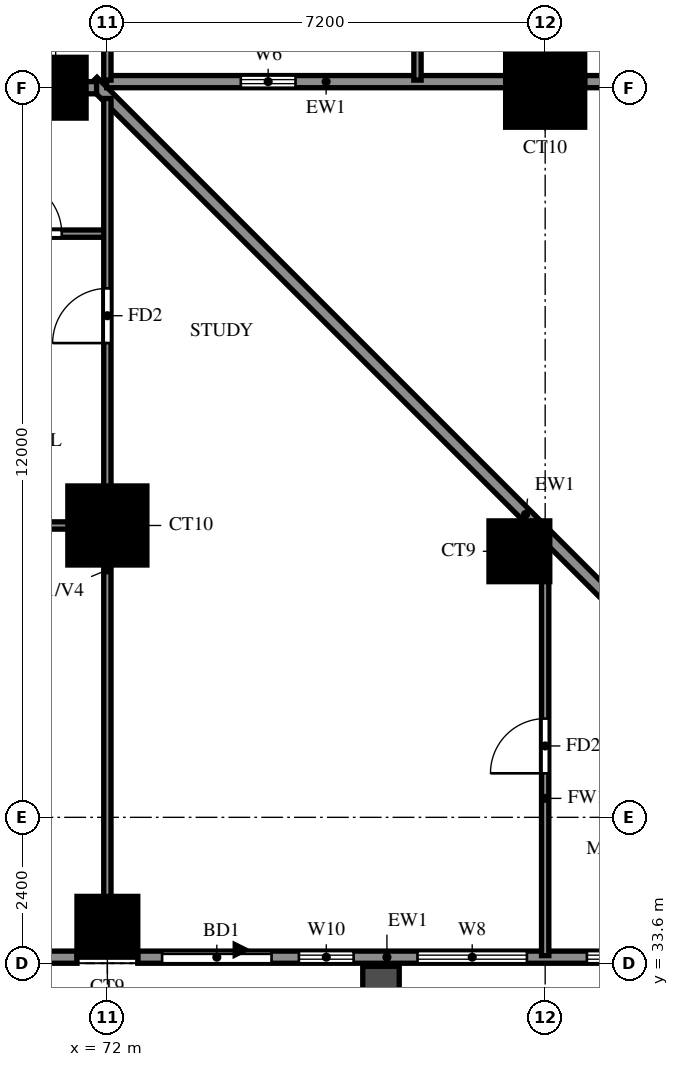
"""IFC4 building model, lengths in metres.
Left out: names, types, materials, properties, quantities, classifications, styles, units other than length and angle.
Written with IfcOpenShell. Run it as: python <this file> out.ifc"""

import sys

from ifc_helpers import new_model, si_unit, direction, frame, frame_2d, origin, origin_2d, place, context, subcontext, project, spatial, rectangle, extrude, source, transform, mapped, element, fill, save


model = new_model("IFC4")
c1 = context("Model", 3, precision=1e-05, world=origin(), true_north=direction((0.0, 1.0)))
c2 = subcontext(c1, "Body", "Model", "MODEL_VIEW")
j1 = project(units=[si_unit("LENGTHUNIT", "METRE"), si_unit("PLANEANGLEUNIT", "RADIAN")], contexts=[c1])
p1 = place(None, origin())
s1 = spatial("IfcSite", under=j1, at=p1, CompositionType="ELEMENT")
p2 = place(p1, origin())
s2 = spatial("IfcBuilding", under=s1, at=p2, CompositionType="ELEMENT")
p3 = place(p2, frame((0.0, 0.0, 86.5)))
s3 = spatial("IfcBuildingStorey", under=s2, at=p3, CompositionType="ELEMENT", Elevation=86.5)
m1 = source(origin(), c2, "Body", "SweptSolid", [
    extrude(rectangle(XDim=1.0, YDim=1.0, at=origin_2d()), origin(), (0.0, 0.0, 1.0), 3.18),
])
for number, where, z_axis, x_axis in (
    (1, (72.0, 34.2, 0.0), (0.0, 0.0, 1.0), (1.0, 0.0, 0.0)),
    (2, (78.776, 40.376, 0.0), (0.0, 0.0, 1.0), (1.0, 0.0, 0.0)),
):
    element("IfcColumn", number, at=place(p3, frame(where, z_axis=z_axis, x_axis=x_axis)), inside=s3, PredefinedType="COLUMN", context=c2, shape_type="MappedRepresentation", body=[
        mapped(m1, transform((0.0, 0.0, 0.0))),
    ])
m2 = source(origin(), c2, "Body", "SweptSolid", [
    extrude(rectangle(XDim=1.3, YDim=1.3, at=origin_2d()), origin(), (0.0, 0.0, 1.0), 3.18),
])
p4 = place(p3, frame((72.0, 40.8, 0.0), z_axis=(0.0, 0.0, 1.0), x_axis=(1.0, 0.0, 0.0)))
e3 = element("IfcColumn", 3, at=p4, inside=s3, PredefinedType="COLUMN", context=c2, shape_type="MappedRepresentation", body=[
    mapped(m2, transform((0.0, 0.0, 0.0))),
])
p5 = place(p3, frame((71.15, 48.0, 0.0), z_axis=(0.0, 0.0, 1.0), x_axis=(1.0, 0.0, 0.0)))
e4 = element("IfcColumn", 4, at=p5, inside=s3, PredefinedType="COLUMN", context=c2, shape_type="MappedRepresentation", body=[
    mapped(m1, transform((0.0, 0.0, 0.0))),
])
p6 = place(p3, frame((79.2, 48.0, 0.0), z_axis=(0.0, 0.0, 1.0), x_axis=(1.0, 0.0, 0.0)))
e5 = element("IfcColumn", 5, at=p6, inside=s3, PredefinedType="COLUMN", context=c2, shape_type="MappedRepresentation", body=[
    mapped(m2, transform((0.0, 0.0, 0.0))),
])
p7 = place(p3, frame((85.996, 33.863, 0.0), z_axis=(0.0, 0.0, 1.0), x_axis=(-0.707100718496, 0.707112843825, 0.0)))
e6 = element("IfcWall", 6, at=p7, inside=s3, PredefinedType="SOLIDWALL", context=c2, shape_type="SweptSolid", body=[
    extrude(rectangle(XDim=20.135, YDim=0.2, at=frame_2d((10.067, 0.0))), origin(), (0.0, 0.0, 1.0), 3.18),
])
p8 = place(p3, frame((71.989, 48.1, 0.0), z_axis=(0.0, 0.0, 1.0), x_axis=(1.0, 0.0, 0.0)))
e7 = element("IfcWall", 7, at=p8, inside=s3, PredefinedType="SOLIDWALL", context=c2, shape_type="SweptSolid", body=[
    extrude(rectangle(XDim=6.562, YDim=0.2, at=frame_2d((3.281, 0.0))), origin(), (0.0, 0.0, 1.0), 3.18),
])
p9 = place(p8, frame((2.206, 0.0, 1.5)))
e8 = element("IfcOpeningElement", 8, at=p9, cuts=e7, PredefinedType="OPENING", context=c2, shape_type="SweptSolid", body=[
    extrude(rectangle(XDim=0.9, YDim=0.9, at=frame_2d((0.45, 0.45))), frame((0.0, 0.11, 0.0), z_axis=(0.0, -1.0, 0.0), x_axis=(1.0, 0.0, 0.0)), (0.0, 0.0, 1.0), 0.22),
])
p10 = place(p3, frame((79.85, 48.1, 0.0), z_axis=(0.0, 0.0, 1.0), x_axis=(1.0, 0.0, 0.0)))
e9 = element("IfcWall", 9, at=p10, inside=s3, PredefinedType="SOLIDWALL", context=c2, shape_type="SweptSolid", body=[
    extrude(rectangle(XDim=5.45, YDim=0.2, at=frame_2d((2.725, 0.0))), origin(), (0.0, 0.0, 1.0), 3.18),
])
p11 = place(p10, frame((1.525, 0.0, 0.6)))
e10 = element("IfcOpeningElement", 10, at=p11, cuts=e9, PredefinedType="OPENING", context=c2, shape_type="SweptSolid", body=[
    extrude(rectangle(XDim=2.4, YDim=2.4, at=frame_2d((1.2, 1.2))), frame((0.0, 0.11, 0.0), z_axis=(0.0, -1.0, 0.0), x_axis=(1.0, 0.0, 0.0)), (0.0, 0.0, 1.0), 0.22),
])
p12 = place(p3, frame((65.3, 33.7, 0.0), z_axis=(0.0, 0.0, 1.0), x_axis=(1.0, 0.0, 0.0)))
e11 = element("IfcWall", 11, at=p12, inside=s3, PredefinedType="SOLIDWALL", context=c2, shape_type="SweptSolid", body=[
    extrude(rectangle(XDim=6.2, YDim=0.2, at=frame_2d((3.1, 0.0))), origin(), (0.0, 0.0, 1.0), 3.18),
])
p13 = place(p12, frame((1.05, 0.0, 0.6)))
e12 = element("IfcOpeningElement", 12, at=p13, cuts=e11, PredefinedType="OPENING", context=c2, shape_type="SweptSolid", body=[
    extrude(rectangle(XDim=2.4, YDim=2.4, at=frame_2d((1.2, 1.2))), frame((0.0, 0.11, 0.0), z_axis=(0.0, -1.0, 0.0), x_axis=(1.0, 0.0, 0.0)), (0.0, 0.0, 1.0), 0.22),
])
p14 = place(p3, frame((72.5, 33.7, 0.0), z_axis=(0.0, 0.0, 1.0), x_axis=(1.0, 0.0, 0.0)))
e13 = element("IfcWall", 13, at=p14, inside=s3, PredefinedType="SOLIDWALL", context=c2, shape_type="SweptSolid", body=[
    extrude(rectangle(XDim=13.659, YDim=0.2, at=frame_2d((6.829, 0.0))), origin(), (0.0, 0.0, 1.0), 3.18),
])
p15 = place(p14, frame((0.4, 0.0, 0.0)))
e14 = element("IfcOpeningElement", 14, at=p15, cuts=e13, PredefinedType="OPENING", context=c2, shape_type="SweptSolid", body=[
    extrude(rectangle(XDim=1.8, YDim=2.4, at=frame_2d((0.9, 1.2))), frame((0.0, 0.11, 0.0), z_axis=(0.0, -1.0, 0.0), x_axis=(1.0, 0.0, 0.0)), (0.0, 0.0, 1.0), 0.22),
])
p16 = place(p14, frame((2.65, 0.0, 0.6)))
e15 = element("IfcOpeningElement", 15, at=p16, cuts=e13, PredefinedType="OPENING", context=c2, shape_type="SweptSolid", body=[
    extrude(rectangle(XDim=0.9, YDim=2.4, at=frame_2d((0.45, 1.2))), frame((0.0, 0.11, 0.0), z_axis=(0.0, -1.0, 0.0), x_axis=(1.0, 0.0, 0.0)), (0.0, 0.0, 1.0), 0.22),
])
p17 = place(p14, frame((4.6, 0.0, 0.6)))
e16 = element("IfcOpeningElement", 16, at=p17, cuts=e13, PredefinedType="OPENING", context=c2, shape_type="SweptSolid", body=[
    extrude(rectangle(XDim=1.8, YDim=2.4, at=frame_2d((0.9, 1.2))), frame((0.0, 0.11, 0.0), z_axis=(0.0, -1.0, 0.0), x_axis=(1.0, 0.0, 0.0)), (0.0, 0.0, 1.0), 0.22),
])
p18 = place(p14, frame((7.386, 0.0, 0.6)))
e17 = element("IfcOpeningElement", 17, at=p18, cuts=e13, PredefinedType="OPENING", context=c2, shape_type="SweptSolid", body=[
    extrude(rectangle(XDim=2.4, YDim=2.4, at=frame_2d((1.2, 1.2))), frame((0.0, 0.11, 0.0), z_axis=(0.0, -1.0, 0.0), x_axis=(1.0, 0.0, 0.0)), (0.0, 0.0, 1.0), 0.22),
])
p19 = place(p14, frame((10.372, 0.0, 0.6)))
e18 = element("IfcOpeningElement", 18, at=p19, cuts=e13, PredefinedType="OPENING", context=c2, shape_type="SweptSolid", body=[
    extrude(rectangle(XDim=2.4, YDim=2.4, at=frame_2d((1.2, 1.2))), frame((0.0, 0.11, 0.0), z_axis=(0.0, -1.0, 0.0), x_axis=(1.0, 0.0, 0.0)), (0.0, 0.0, 1.0), 0.22),
])
p20 = place(p3, frame((76.5, 33.55, 0.0), z_axis=(0.0, 0.0, 1.0), x_axis=(0.0, -1.0, 0.0)))
e19 = element("IfcWall", 19, at=p20, inside=s3, PredefinedType="SOLIDWALL", context=c2, shape_type="SweptSolid", body=[
    extrude(rectangle(XDim=2.65, YDim=0.6, at=frame_2d((1.325, 0.0))), origin(), (0.0, 0.0, 1.0), 2.85),
])
p21 = place(p3, frame((67.2, 48.0, 0.0), z_axis=(0.0, 0.0, 1.0), x_axis=(1.0, 0.0, 0.0)))
e20 = element("IfcWall", 20, at=p21, inside=s3, PredefinedType="SOLIDWALL", context=c2, shape_type="SweptSolid", body=[
    extrude(rectangle(XDim=4.623, YDim=0.2, at=frame_2d((2.312, 0.0))), origin(), (0.0, 0.0, 1.0), 3.18),
])
p22 = place(p3, frame((60.0, 40.8, 0.0), z_axis=(0.0, 0.0, 1.0), x_axis=(1.0, 0.0, 0.0)))
e21 = element("IfcWall", 21, at=p22, inside=s3, PredefinedType="PARTITIONING", context=c2, shape_type="SweptSolid", body=[
    extrude(rectangle(XDim=12.0, YDim=0.12, at=frame_2d((6.0, 0.0))), origin(), (0.0, 0.0, 1.0), 3.18),
])
p23 = place(p22, frame((7.65, 0.0, 0.0)))
e22 = element("IfcOpeningElement", 22, at=p23, cuts=e21, PredefinedType="OPENING", context=c2, shape_type="SweptSolid", body=[
    extrude(rectangle(XDim=1.5, YDim=2.1, at=frame_2d((0.75, 1.05))), frame((0.0, 0.07, 0.0), z_axis=(0.0, -1.0, 0.0), x_axis=(1.0, 0.0, 0.0)), (0.0, 0.0, 1.0), 0.14),
])
p24 = place(p22, frame((1.95, 0.0, 0.0)))
e23 = element("IfcOpeningElement", 23, at=p24, cuts=e21, PredefinedType="OPENING", context=c2, shape_type="SweptSolid", body=[
    extrude(rectangle(XDim=0.9, YDim=2.1, at=frame_2d((0.45, 1.05))), frame((0.0, 0.07, 0.0), z_axis=(0.0, -1.0, 0.0), x_axis=(1.0, 0.0, 0.0)), (0.0, 0.0, 1.0), 0.14),
])
p25 = place(p3, frame((67.2, 45.6, 0.0), z_axis=(0.0, 0.0, 1.0), x_axis=(1.0, 0.0, 0.0)))
e24 = element("IfcWall", 24, at=p25, inside=s3, PredefinedType="PARTITIONING", context=c2, shape_type="SweptSolid", body=[
    extrude(rectangle(XDim=4.8, YDim=0.12, at=frame_2d((2.4, 0.0))), origin(), (0.0, 0.0, 1.0), 3.18),
])
p26 = place(p25, frame((3.15, 0.0, 0.0)))
e25 = element("IfcOpeningElement", 25, at=p26, cuts=e24, PredefinedType="OPENING", context=c2, shape_type="SweptSolid", body=[
    extrude(rectangle(XDim=0.9, YDim=2.1, at=frame_2d((0.45, 1.05))), frame((0.0, 0.07, 0.0), z_axis=(0.0, -1.0, 0.0), x_axis=(1.0, 0.0, 0.0)), (0.0, 0.0, 1.0), 0.14),
])
p27 = place(p3, frame((72.0, 33.725, 0.0), z_axis=(0.0, 0.0, 1.0), x_axis=(0.0, 1.0, 0.0)))
e26 = element("IfcWall", 26, at=p27, inside=s3, PredefinedType="PARTITIONING", context=c2, shape_type="SweptSolid", body=[
    extrude(rectangle(XDim=14.098, YDim=0.12, at=frame_2d((7.049, 0.0))), origin(), (0.0, 0.0, 1.0), 2.28),
])
p28 = place(p27, frame((10.075, 0.0, 0.0)))
e27 = element("IfcOpeningElement", 27, at=p28, cuts=e26, PredefinedType="OPENING", context=c2, shape_type="SweptSolid", body=[
    extrude(rectangle(XDim=0.9, YDim=2.1, at=frame_2d((0.45, 1.05))), frame((0.0, 0.07, 0.0), z_axis=(0.0, -1.0, 0.0), x_axis=(1.0, 0.0, 0.0)), (0.0, 0.0, 1.0), 0.14),
])
for number, where, z_axis, x_axis in (
    (28, (72.0, 48.125, 0.0), (0.0, 0.0, 1.0), (0.0, 1.0, 0.0)),
    (29, (77.1, 48.125, 0.0), (0.0, 0.0, 1.0), (0.0, 1.0, 0.0)),
):
    element("IfcWall", number, at=place(p3, frame(where, z_axis=z_axis, x_axis=x_axis)), inside=s3, PredefinedType="PARTITIONING", context=c2, shape_type="SweptSolid", body=[
        extrude(rectangle(XDim=3.475, YDim=0.12, at=frame_2d((1.738, 0.0))), origin(), (0.0, 0.0, 1.0), 3.18),
    ])
p29 = place(p3, frame((79.2, 33.725, 0.0), z_axis=(0.0, 0.0, 1.0), x_axis=(0.0, 1.0, 0.0)))
e30 = element("IfcWall", 30, at=p29, inside=s3, PredefinedType="PARTITIONING", context=c2, shape_type="SweptSolid", body=[
    extrude(rectangle(XDim=6.898, YDim=0.12, at=frame_2d((3.449, 0.0))), origin(), (0.0, 0.0, 1.0), 3.18),
])
p30 = place(p29, frame((2.999, 0.0, 0.0)))
e31 = element("IfcOpeningElement", 31, at=p30, cuts=e30, PredefinedType="OPENING", context=c2, shape_type="SweptSolid", body=[
    extrude(rectangle(XDim=0.9, YDim=2.1, at=frame_2d((0.45, 1.05))), frame((0.0, 0.07, 0.0), z_axis=(0.0, -1.0, 0.0), x_axis=(1.0, 0.0, 0.0)), (0.0, 0.0, 1.0), 0.14),
])
p31 = place(p3, frame((79.2, 48.125, 0.0), z_axis=(0.0, 0.0, 1.0), x_axis=(0.0, 1.0, 0.0)))
e32 = element("IfcWall", 32, at=p31, inside=s3, PredefinedType="PARTITIONING", context=c2, shape_type="SweptSolid", body=[
    extrude(rectangle(XDim=21.475, YDim=0.12, at=frame_2d((10.738, 0.0))), origin(), (0.0, 0.0, 1.0), 3.18),
])
p32 = place(p31, frame((2.788, 0.0, 0.0)))
e33 = element("IfcOpeningElement", 33, at=p32, cuts=e32, PredefinedType="OPENING", context=c2, shape_type="SweptSolid", body=[
    extrude(rectangle(XDim=1.5, YDim=2.1, at=frame_2d((0.75, 1.05))), frame((0.0, 0.07, 0.0), z_axis=(0.0, -1.0, 0.0), x_axis=(1.0, 0.0, 0.0)), (0.0, 0.0, 1.0), 0.14),
])
p33 = place(p31, frame((8.425, 0.0, 0.0)))
e34 = element("IfcOpeningElement", 34, at=p33, cuts=e32, PredefinedType="OPENING", context=c2, shape_type="SweptSolid", body=[
    extrude(rectangle(XDim=0.9, YDim=2.1, at=frame_2d((0.45, 1.05))), frame((0.0, 0.07, 0.0), z_axis=(0.0, -1.0, 0.0), x_axis=(1.0, 0.0, 0.0)), (0.0, 0.0, 1.0), 0.14),
])
p34 = place(p31, frame((12.025, 0.0, 0.0)))
e35 = element("IfcOpeningElement", 35, at=p34, cuts=e32, PredefinedType="OPENING", context=c2, shape_type="SweptSolid", body=[
    extrude(rectangle(XDim=0.9, YDim=2.1, at=frame_2d((0.45, 1.05))), frame((0.0, 0.07, 0.0), z_axis=(0.0, -1.0, 0.0), x_axis=(1.0, 0.0, 0.0)), (0.0, 0.0, 1.0), 0.14),
])
p35 = place(p31, frame((17.425, 0.0, 0.0)))
e36 = element("IfcOpeningElement", 36, at=p35, cuts=e32, PredefinedType="OPENING", context=c2, shape_type="SweptSolid", body=[
    extrude(rectangle(XDim=0.9, YDim=2.1, at=frame_2d((0.45, 1.05))), frame((0.0, 0.07, 0.0), z_axis=(0.0, -1.0, 0.0), x_axis=(1.0, 0.0, 0.0)), (0.0, 0.0, 1.0), 0.14),
])
p36 = place(p9, origin())
e37 = element("IfcWindow", 37, at=p36, inside=s3, PartitioningType="SINGLE_PANEL", PredefinedType="WINDOW", context=c2, shape_type="SweptSolid", body=[
    extrude(rectangle(XDim=0.9, YDim=0.9, at=frame_2d((0.45, 0.45))), frame((0.0, 0.03, 0.0), z_axis=(0.0, -1.0, 0.0), x_axis=(1.0, 0.0, 0.0)), (0.0, 0.0, 1.0), 0.06),
])
fill(e8, e37)
p37 = place(p15, origin())
e38 = element("IfcDoor", 38, at=p37, inside=s3, OperationType="DOUBLE_DOOR_SLIDING", PredefinedType="DOOR", context=c2, shape_type="SweptSolid", body=[
    extrude(rectangle(XDim=1.8, YDim=2.4, at=frame_2d((0.9, 1.2))), frame((0.0, 0.025, 0.0), z_axis=(0.0, -1.0, 0.0), x_axis=(1.0, 0.0, 0.0)), (0.0, 0.0, 1.0), 0.05),
])
fill(e14, e38)
p38 = place(p16, origin())
e39 = element("IfcWindow", 39, at=p38, inside=s3, PartitioningType="SINGLE_PANEL", PredefinedType="WINDOW", context=c2, shape_type="SweptSolid", body=[
    extrude(rectangle(XDim=0.9, YDim=2.4, at=frame_2d((0.45, 1.2))), frame((0.0, 0.03, 0.0), z_axis=(0.0, -1.0, 0.0), x_axis=(1.0, 0.0, 0.0)), (0.0, 0.0, 1.0), 0.06),
])
fill(e15, e39)
p39 = place(p17, origin())
e40 = element("IfcWindow", 40, at=p39, inside=s3, PartitioningType="DOUBLE_PANEL_VERTICAL", PredefinedType="WINDOW", context=c2, shape_type="SweptSolid", body=[
    extrude(rectangle(XDim=1.8, YDim=2.4, at=frame_2d((0.9, 1.2))), frame((0.0, 0.03, 0.0), z_axis=(0.0, -1.0, 0.0), x_axis=(1.0, 0.0, 0.0)), (0.0, 0.0, 1.0), 0.06),
])
fill(e16, e40)
p40 = place(p18, origin())
e41 = element("IfcWindow", 41, at=p40, inside=s3, PartitioningType="DOUBLE_PANEL_VERTICAL", PredefinedType="WINDOW", context=c2, shape_type="SweptSolid", body=[
    extrude(rectangle(XDim=2.4, YDim=2.4, at=frame_2d((1.2, 1.2))), frame((0.0, 0.03, 0.0), z_axis=(0.0, -1.0, 0.0), x_axis=(1.0, 0.0, 0.0)), (0.0, 0.0, 1.0), 0.06),
])
fill(e17, e41)
p41 = place(p26, origin())
e42 = element("IfcDoor", 42, at=p41, inside=s3, OperationType="SINGLE_SWING_RIGHT", PredefinedType="DOOR", context=c2, shape_type="SweptSolid", body=[
    extrude(rectangle(XDim=0.9, YDim=2.1, at=frame_2d((0.45, 1.05))), frame((0.0, 0.025, 0.0), z_axis=(0.0, -1.0, 0.0), x_axis=(1.0, 0.0, 0.0)), (0.0, 0.0, 1.0), 0.05),
])
fill(e25, e42)
p42 = place(p28, origin())
e43 = element("IfcDoor", 43, at=p42, inside=s3, OperationType="SINGLE_SWING_LEFT", PredefinedType="DOOR", context=c2, shape_type="SweptSolid", body=[
    extrude(rectangle(XDim=0.9, YDim=2.1, at=frame_2d((0.45, 1.05))), frame((0.0, 0.025, 0.0), z_axis=(0.0, -1.0, 0.0), x_axis=(1.0, 0.0, 0.0)), (0.0, 0.0, 1.0), 0.05),
])
fill(e27, e43)
p43 = place(p30, origin())
e44 = element("IfcDoor", 44, at=p43, inside=s3, OperationType="SINGLE_SWING_LEFT", PredefinedType="DOOR", context=c2, shape_type="SweptSolid", body=[
    extrude(rectangle(XDim=0.9, YDim=2.1, at=frame_2d((0.45, 1.05))), frame((0.0, 0.025, 0.0), z_axis=(0.0, -1.0, 0.0), x_axis=(1.0, 0.0, 0.0)), (0.0, 0.0, 1.0), 0.05),
])
fill(e31, e44)
save(model, sys.argv[1])
